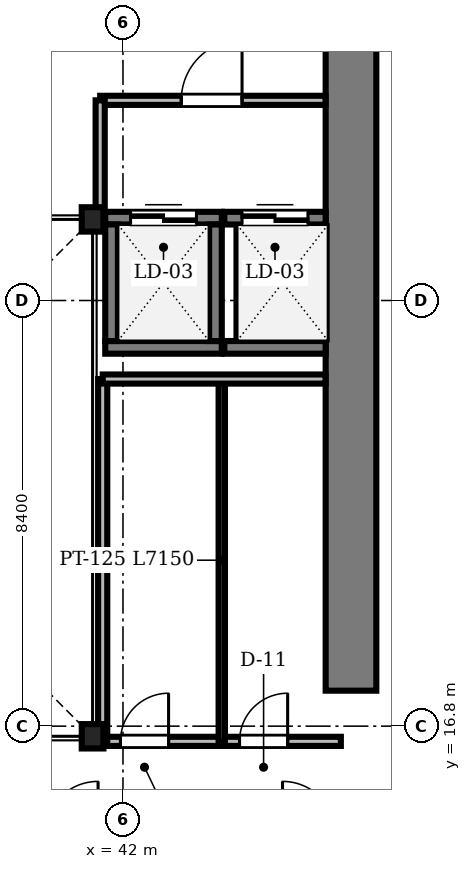
"""IFC4 building model, lengths in metres.
Left out: names, types, materials, properties, quantities, classifications, styles, units other than length and angle.
Written with IfcOpenShell. Run it as: python <this file> out.ifc"""

import sys

from ifc_helpers import new_model, si_unit, direction, frame, frame_2d, origin, origin_2d, place, context, subcontext, project, spatial, rectangle, i_section, extrude, source, transform, mapped, element, fill, save


model = new_model("IFC4")
c1 = context("Model", 3, precision=1e-05, world=origin(), true_north=direction((0.0, 1.0)))
c2 = subcontext(c1, "Body", "Model", "MODEL_VIEW")
j1 = project(units=[si_unit("LENGTHUNIT", "METRE"), si_unit("PLANEANGLEUNIT", "RADIAN")], contexts=[c1])
p1 = place(None, origin())
s1 = spatial("IfcSite", under=j1, at=p1, CompositionType="ELEMENT")
p2 = place(p1, origin())
s2 = spatial("IfcBuilding", under=s1, at=p2, CompositionType="ELEMENT")
p3 = place(p2, frame((0.0, 0.0, 64.1)))
s3 = spatial("IfcBuildingStorey", under=s2, at=p3, CompositionType="ELEMENT", Elevation=64.1)
m1 = source(origin(), c2, "Body", "SweptSolid", [
    extrude(rectangle(XDim=13.15, YDim=1.0, at=frame_2d((6.575, 0.0))), origin(), (0.0, 0.0, 1.0), 3.41),
])
p4 = place(p3, frame((46.5, 17.5, 0.0), z_axis=(0.0, 0.0, 1.0), x_axis=(0.0, 1.0, 0.0)))
e1 = element("IfcWall", 1, at=p4, inside=s3, PredefinedType="SHEAR", context=c2, shape_type="MappedRepresentation", body=[
    mapped(m1, transform((0.0, 0.0, 0.0), scale=1.0)),
])
m2 = source(origin(), c2, "Body", "SweptSolid", [
    extrude(i_section(OverallWidth=0.428, OverallDepth=0.481, WebThickness=0.04, FlangeThickness=0.063, FilletRadius=0.015, at=origin_2d()), origin(), (0.0, 0.0, 1.0), 3.41),
])
for number, where, z_axis, x_axis in (
    (2, (41.4, 16.6, 0.0), (0.0, 0.0, 1.0), (1.0, 0.0, 0.0)),
    (3, (41.4, 26.8, 0.0), (0.0, 0.0, 1.0), (1.0, 0.0, 0.0)),
):
    element("IfcColumn", number, at=place(p3, frame(where, z_axis=z_axis, x_axis=x_axis)), inside=s3, PredefinedType="COLUMN", context=c2, shape_type="MappedRepresentation", body=[
        mapped(m2, transform((0.0, 0.0, 0.0), scale=1.0)),
    ])
m3 = source(origin(), c2, "Body", "SweptSolid", [
    extrude(rectangle(XDim=2.3, YDim=0.25, at=frame_2d((1.15, 0.0))), origin(), (0.0, 0.0, 1.0), 3.41),
])
p5 = place(p3, frame((41.65, 24.275, 0.0), z_axis=(0.0, 0.0, 1.0), x_axis=(1.0, 0.0, 0.0)))
e4 = element("IfcWall", 4, at=p5, inside=s3, PredefinedType="SOLIDWALL", context=c2, shape_type="MappedRepresentation", body=[
    mapped(m3, transform((0.0, 0.0, 0.0), scale=1.0)),
])
p6 = place(p3, frame((41.65, 26.825, 0.0), z_axis=(0.0, 0.0, 1.0), x_axis=(1.0, 0.0, 0.0)))
e5 = element("IfcWall", 5, at=p6, inside=s3, PredefinedType="SOLIDWALL", context=c2, shape_type="MappedRepresentation", body=[
    mapped(m3, transform((0.0, 0.0, 0.0), scale=1.0)),
])
m4 = source(origin(), c2, "Body", "SweptSolid", [
    extrude(rectangle(XDim=1.3, YDim=2.3, at=frame_2d((0.65, 1.15))), frame((0.0, 0.135, 0.0), z_axis=(0.0, -1.0, 0.0), x_axis=(1.0, 0.0, 0.0)), (0.0, 0.0, 1.0), 0.27),
])
p7 = place(p6, frame((0.5, 0.0, 0.0)))
e6 = element("IfcOpeningElement", 6, at=p7, cuts=e5, PredefinedType="OPENING", context=c2, shape_type="MappedRepresentation", body=[
    mapped(m4, transform((0.0, 0.0, 0.0), scale=1.0)),
])
for number, where, z_axis, x_axis in (
    (7, (41.775, 24.4, 0.0), (0.0, 0.0, 1.0), (0.0, 1.0, 0.0)),
    (8, (43.825, 24.4, 0.0), (0.0, 0.0, 1.0), (0.0, 1.0, 0.0)),
):
    element("IfcWall", number, at=place(p3, frame(where, z_axis=z_axis, x_axis=x_axis)), inside=s3, PredefinedType="SOLIDWALL", context=c2, shape_type="MappedRepresentation", body=[
        mapped(m3, transform((0.0, 0.0, 0.0), scale=1.0)),
    ])
m5 = source(origin(), c2, "Body", "SweptSolid", [
    extrude(rectangle(XDim=2.0, YDim=0.25, at=frame_2d((1.0, 0.0))), origin(), (0.0, 0.0, 1.0), 3.41),
])
p8 = place(p3, frame((44.0, 24.275, 0.0), z_axis=(0.0, 0.0, 1.0), x_axis=(1.0, 0.0, 0.0)))
e9 = element("IfcWall", 9, at=p8, inside=s3, PredefinedType="SOLIDWALL", context=c2, shape_type="MappedRepresentation", body=[
    mapped(m5, transform((0.0, 0.0, 0.0), scale=1.0)),
])
p9 = place(p3, frame((44.0, 26.825, 0.0), z_axis=(0.0, 0.0, 1.0), x_axis=(1.0, 0.0, 0.0)))
e10 = element("IfcWall", 10, at=p9, inside=s3, PredefinedType="SOLIDWALL", context=c2, shape_type="MappedRepresentation", body=[
    mapped(m5, transform((0.0, 0.0, 0.0), scale=1.0)),
])
p10 = place(p9, frame((0.35, 0.0, 0.0)))
e11 = element("IfcOpeningElement", 11, at=p10, cuts=e10, PredefinedType="OPENING", context=c2, shape_type="MappedRepresentation", body=[
    mapped(m4, transform((0.0, 0.0, 0.0), scale=1.0)),
])
m6 = source(origin(), c2, "Body", "SweptSolid", [
    extrude(rectangle(XDim=4.448, YDim=0.18, at=frame_2d((2.224, 0.0))), origin(), (0.0, 0.0, 1.0), 3.042),
])
p11 = place(p3, frame((41.55, 29.15, 0.0), z_axis=(0.0, 0.0, 1.0), x_axis=(1.0, 0.0, 0.0)))
e12 = element("IfcWall", 12, at=p11, inside=s3, PredefinedType="PARTITIONING", context=c2, shape_type="MappedRepresentation", body=[
    mapped(m6, transform((0.0, 0.0, 0.0), scale=1.0)),
])
m7 = source(origin(), c2, "Body", "SweptSolid", [
    extrude(rectangle(XDim=1.2, YDim=2.2, at=frame_2d((0.6, 1.1))), frame((0.0, 0.1, 0.0), z_axis=(0.0, -1.0, 0.0), x_axis=(1.0, 0.0, 0.0)), (0.0, 0.0, 1.0), 0.2),
])
p12 = place(p11, frame((1.6, 0.0, 0.0)))
e13 = element("IfcOpeningElement", 13, at=p12, cuts=e12, PredefinedType="OPENING", context=c2, shape_type="MappedRepresentation", body=[
    mapped(m7, transform((0.0, 0.0, 0.0), scale=1.0)),
])
m8 = source(origin(), c2, "Body", "SweptSolid", [
    extrude(rectangle(XDim=4.7, YDim=0.18, at=frame_2d((2.35, 0.0))), origin(), (0.0, 0.0, 1.0), 2.802),
])
p13 = place(p3, frame((41.6, 16.5, 0.0), z_axis=(0.0, 0.0, 1.0), x_axis=(1.0, 0.0, 0.0)))
e14 = element("IfcWall", 14, at=p13, inside=s3, PredefinedType="PARTITIONING", context=c2, shape_type="MappedRepresentation", body=[
    mapped(m8, transform((0.0, 0.0, 0.0), scale=1.0)),
])
m9 = source(origin(), c2, "Body", "SweptSolid", [
    extrude(rectangle(XDim=0.95, YDim=2.15, at=frame_2d((0.475, 1.075))), frame((0.0, 0.1, 0.0), z_axis=(0.0, -1.0, 0.0), x_axis=(1.0, 0.0, 0.0)), (0.0, 0.0, 1.0), 0.2),
])
p14 = place(p13, frame((0.35, 0.0, 0.0)))
e15 = element("IfcOpeningElement", 15, at=p14, cuts=e14, PredefinedType="OPENING", context=c2, shape_type="MappedRepresentation", body=[
    mapped(m9, transform((0.0, 0.0, 0.0), scale=1.0)),
])
p15 = place(p13, frame((2.7, 0.0, 0.0)))
e16 = element("IfcOpeningElement", 16, at=p15, cuts=e14, PredefinedType="OPENING", context=c2, shape_type="MappedRepresentation", body=[
    mapped(m9, transform((0.0, 0.0, 0.0), scale=1.0)),
])
m10 = source(origin(), c2, "Body", "SweptSolid", [
    extrude(rectangle(XDim=7.15, YDim=0.18, at=frame_2d((3.575, 0.0))), origin(), (0.0, 0.0, 1.0), 2.802),
])
p16 = place(p3, frame((41.6, 16.5, 0.0), z_axis=(0.0, 0.0, 1.0), x_axis=(0.0, 1.0, 0.0)))
e17 = element("IfcWall", 17, at=p16, inside=s3, PredefinedType="PARTITIONING", context=c2, shape_type="MappedRepresentation", body=[
    mapped(m10, transform((0.0, 0.0, 0.0), scale=1.0)),
])
m11 = source(origin(), c2, "Body", "SweptSolid", [
    extrude(rectangle(XDim=7.15, YDim=0.125, at=frame_2d((3.575, 0.0))), origin(), (0.0, 0.0, 1.0), 2.802),
])
p17 = place(p3, frame((43.95, 16.5, 0.0), z_axis=(0.0, 0.0, 1.0), x_axis=(0.0, 1.0, 0.0)))
e18 = element("IfcWall", 18, at=p17, inside=s3, PredefinedType="PARTITIONING", context=c2, shape_type="MappedRepresentation", body=[
    mapped(m11, transform((0.0, 0.0, 0.0), scale=1.0)),
])
m12 = source(origin(), c2, "Body", "SweptSolid", [
    extrude(rectangle(XDim=4.398, YDim=0.18, at=frame_2d((2.199, 0.0))), origin(), (0.0, 0.0, 1.0), 3.41),
])
p18 = place(p3, frame((41.6, 23.65, 0.0), z_axis=(0.0, 0.0, 1.0), x_axis=(1.0, 0.0, 0.0)))
e19 = element("IfcWall", 19, at=p18, inside=s3, PredefinedType="PARTITIONING", context=c2, shape_type="MappedRepresentation", body=[
    mapped(m12, transform((0.0, 0.0, 0.0), scale=1.0)),
])
m13 = source(origin(), c2, "Body", "SweptSolid", [
    extrude(rectangle(XDim=2.35, YDim=0.18, at=frame_2d((1.175, 0.0))), origin(), (0.0, 0.0, 1.0), 2.802),
])
p19 = place(p3, frame((41.55, 26.8, 0.0), z_axis=(0.0, 0.0, 1.0), x_axis=(0.0, 1.0, 0.0)))
e20 = element("IfcWall", 20, at=p19, inside=s3, PredefinedType="PARTITIONING", context=c2, shape_type="MappedRepresentation", body=[
    mapped(m13, transform((0.0, 0.0, 0.0), scale=1.0)),
])
m14 = source(origin(), c2, "Body", "SweptSolid", [
    extrude(rectangle(XDim=1.3, YDim=2.3, at=frame_2d((0.65, 1.15))), frame((0.0, 0.025, 0.0), z_axis=(0.0, -1.0, 0.0), x_axis=(1.0, 0.0, 0.0)), (0.0, 0.0, 1.0), 0.05),
])
p20 = place(p7, origin())
e21 = element("IfcDoor", 21, at=p20, inside=s3, OperationType="DOUBLE_DOOR_SLIDING", PredefinedType="DOOR", context=c2, shape_type="MappedRepresentation", body=[
    mapped(m14, transform((0.0, 0.0, 0.0), scale=1.0)),
])
fill(e6, e21)
p21 = place(p10, origin())
e22 = element("IfcDoor", 22, at=p21, inside=s3, OperationType="DOUBLE_DOOR_SLIDING", PredefinedType="DOOR", context=c2, shape_type="MappedRepresentation", body=[
    mapped(m14, transform((0.0, 0.0, 0.0), scale=1.0)),
])
fill(e11, e22)
m15 = source(origin(), c2, "Body", "SweptSolid", [
    extrude(rectangle(XDim=1.2, YDim=2.2, at=frame_2d((0.6, 1.1))), frame((0.0, 0.025, 0.0), z_axis=(0.0, -1.0, 0.0), x_axis=(1.0, 0.0, 0.0)), (0.0, 0.0, 1.0), 0.05),
])
p22 = place(p12, origin())
e23 = element("IfcDoor", 23, at=p22, inside=s3, OperationType="SINGLE_SWING_RIGHT", PredefinedType="DOOR", context=c2, shape_type="MappedRepresentation", body=[
    mapped(m15, transform((0.0, 0.0, 0.0), scale=1.0)),
])
fill(e13, e23)
m16 = source(origin(), c2, "Body", "SweptSolid", [
    extrude(rectangle(XDim=0.95, YDim=2.15, at=frame_2d((0.475, 1.075))), frame((0.0, 0.025, 0.0), z_axis=(0.0, -1.0, 0.0), x_axis=(1.0, 0.0, 0.0)), (0.0, 0.0, 1.0), 0.05),
])
p23 = place(p14, origin())
e24 = element("IfcDoor", 24, at=p23, inside=s3, OperationType="SINGLE_SWING_RIGHT", PredefinedType="DOOR", context=c2, shape_type="MappedRepresentation", body=[
    mapped(m16, transform((0.0, 0.0, 0.0), scale=1.0)),
])
fill(e15, e24)
p24 = place(p15, origin())
e25 = element("IfcDoor", 25, at=p24, inside=s3, OperationType="SINGLE_SWING_RIGHT", PredefinedType="DOOR", context=c2, shape_type="MappedRepresentation", body=[
    mapped(m16, transform((0.0, 0.0, 0.0), scale=1.0)),
])
fill(e16, e25)
save(model, sys.argv[1])
